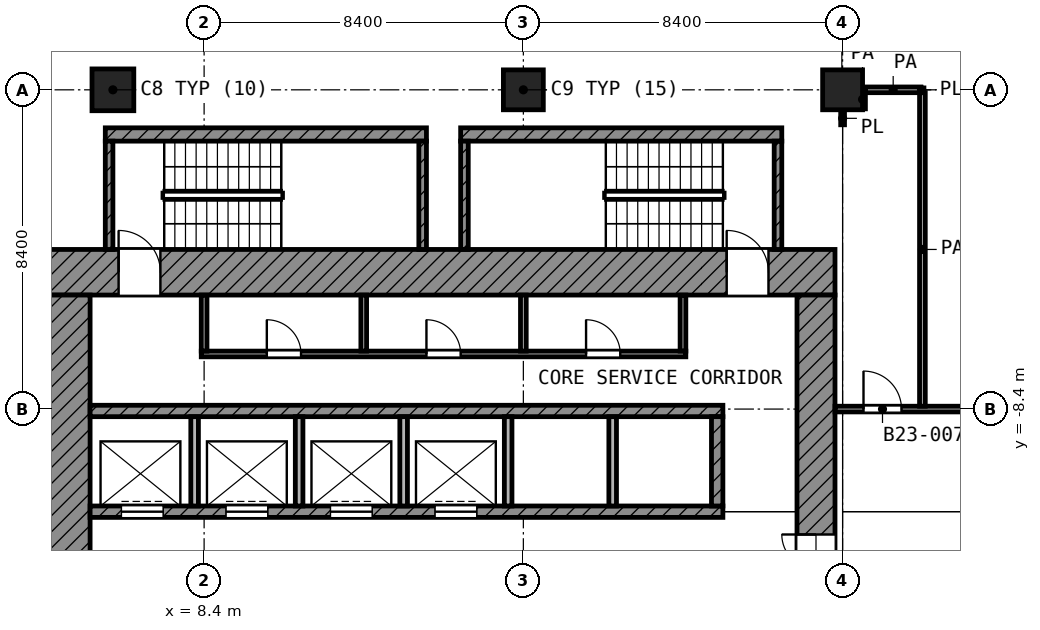
"""IFC4 building model, lengths in metres.
Left out: names, types, materials, properties, quantities, classifications, styles, units other than length and angle.
Written with IfcOpenShell. Run it as: python <this file> out.ifc"""

import sys

from ifc_helpers import new_model, si_unit, direction, frame, frame_2d, origin, origin_2d, place, context, subcontext, project, spatial, rectangle, extrude, element, fill, save


model = new_model("IFC4")
c1 = context("Model", 3, precision=1e-05, world=origin(), true_north=direction((0.0, 1.0)))
c2 = subcontext(c1, "Body", "Model", "MODEL_VIEW")
j1 = project(units=[si_unit("LENGTHUNIT", "METRE"), si_unit("PLANEANGLEUNIT", "RADIAN")], contexts=[c1])
p1 = place(None, origin())
s1 = spatial("IfcSite", under=j1, at=p1, CompositionType="ELEMENT")
p2 = place(p1, origin())
s2 = spatial("IfcBuilding", under=s1, at=p2, CompositionType="ELEMENT")
p3 = place(p2, frame((0.0, 0.0, 103.0)))
s3 = spatial("IfcBuildingStorey", under=s2, at=p3, CompositionType="ELEMENT", Elevation=103.0)
p4 = place(p3, frame((6.0, 0.0, 0.0), z_axis=(0.0, 0.0, 1.0), x_axis=(1.0, 0.0, 0.0)))
e1 = element("IfcColumn", 1, at=p4, inside=s3, PredefinedType="COLUMN", context=c2, shape_type="SweptSolid", body=[
    extrude(rectangle(XDim=1.1, YDim=1.1, at=origin_2d()), origin(), (0.0, 0.0, 1.0), 4.2),
])
for number, where, z_axis, x_axis in (
    (2, (16.8, 0.0, 0.0), (0.0, 0.0, 1.0), (1.0, 0.0, 0.0)),
    (3, (25.2, 0.0, 0.0), (0.0, 0.0, 1.0), (1.0, 0.0, 0.0)),
):
    element("IfcColumn", number, at=place(p3, frame(where, z_axis=z_axis, x_axis=x_axis)), inside=s3, PredefinedType="COLUMN", context=c2, shape_type="SweptSolid", body=[
        extrude(rectangle(XDim=1.05, YDim=1.05, at=origin_2d()), origin(), (0.0, 0.0, 1.0), 4.2),
    ])
p5 = place(p3, frame((4.2, -4.8, 0.0), z_axis=(0.0, 0.0, 1.0), x_axis=(1.0, 0.0, 0.0)))
e4 = element("IfcWall", 4, at=p5, inside=s3, PredefinedType="SHEAR", context=c2, shape_type="SweptSolid", body=[
    extrude(rectangle(XDim=20.8, YDim=1.2, at=frame_2d((10.4, 0.0))), origin(), (0.0, 0.0, 1.0), 3.6),
])
p6 = place(p5, frame((1.95, 0.0, 0.0)))
e5 = element("IfcOpeningElement", 5, at=p6, cuts=e4, PredefinedType="OPENING", context=c2, shape_type="SweptSolid", body=[
    extrude(rectangle(XDim=1.1, YDim=2.1, at=frame_2d((0.55, 1.05))), frame((0.0, 0.61, 0.0), z_axis=(0.0, -1.0, 0.0), x_axis=(1.0, 0.0, 0.0)), (0.0, 0.0, 1.0), 1.22),
])
p7 = place(p5, frame((17.95, 0.0, 0.0)))
e6 = element("IfcOpeningElement", 6, at=p7, cuts=e4, PredefinedType="OPENING", context=c2, shape_type="SweptSolid", body=[
    extrude(rectangle(XDim=1.1, YDim=2.1, at=frame_2d((0.55, 1.05))), frame((0.0, 0.61, 0.0), z_axis=(0.0, -1.0, 0.0), x_axis=(1.0, 0.0, 0.0)), (0.0, 0.0, 1.0), 1.22),
])
p8 = place(p3, frame((4.8, -25.0, 0.0), z_axis=(0.0, 0.0, 1.0), x_axis=(0.0, 1.0, 0.0)))
e7 = element("IfcWall", 7, at=p8, inside=s3, PredefinedType="SHEAR", context=c2, shape_type="SweptSolid", body=[
    extrude(rectangle(XDim=19.6, YDim=1.2, at=frame_2d((9.8, 0.0))), origin(), (0.0, 0.0, 1.0), 3.6),
])
p9 = place(p8, frame((11.45, 0.0, 0.0)))
e8 = element("IfcOpeningElement", 8, at=p9, cuts=e7, PredefinedType="OPENING", context=c2, shape_type="SweptSolid", body=[
    extrude(rectangle(XDim=1.1, YDim=2.1, at=frame_2d((0.55, 1.05))), frame((0.0, 0.61, 0.0), z_axis=(0.0, -1.0, 0.0), x_axis=(1.0, 0.0, 0.0)), (0.0, 0.0, 1.0), 1.22),
])
p10 = place(p8, frame((2.15, 0.0, 0.0)))
e9 = element("IfcOpeningElement", 9, at=p10, cuts=e7, PredefinedType="OPENING", context=c2, shape_type="SweptSolid", body=[
    extrude(rectangle(XDim=1.1, YDim=2.1, at=frame_2d((0.55, 1.05))), frame((0.0, 0.61, 0.0), z_axis=(0.0, -1.0, 0.0), x_axis=(1.0, 0.0, 0.0)), (0.0, 0.0, 1.0), 1.22),
])
p11 = place(p3, frame((24.5, -24.0, 0.0), z_axis=(0.0, 0.0, 1.0), x_axis=(0.0, 1.0, 0.0)))
e10 = element("IfcWall", 10, at=p11, inside=s3, PredefinedType="SHEAR", context=c2, shape_type="SweptSolid", body=[
    extrude(rectangle(XDim=18.6, YDim=1.0, at=frame_2d((9.3, 0.0))), origin(), (0.0, 0.0, 1.0), 3.6),
])
p12 = place(p11, frame((10.5, 0.0, 0.0)))
e11 = element("IfcOpeningElement", 11, at=p12, cuts=e10, PredefinedType="OPENING", context=c2, shape_type="SweptSolid", body=[
    extrude(rectangle(XDim=1.8, YDim=2.1, at=frame_2d((0.9, 1.05))), frame((0.0, 0.51, 0.0), z_axis=(0.0, -1.0, 0.0), x_axis=(1.0, 0.0, 0.0)), (0.0, 0.0, 1.0), 1.02),
])
p13 = place(p3, frame((5.4, -8.45, 0.0), z_axis=(0.0, 0.0, 1.0), x_axis=(1.0, 0.0, 0.0)))
e12 = element("IfcWall", 12, at=p13, inside=s3, PredefinedType="SHEAR", context=c2, shape_type="SweptSolid", body=[
    extrude(rectangle(XDim=16.65, YDim=0.3, at=frame_2d((8.325, 0.0))), origin(), (0.0, 0.0, 1.0), 3.6),
])
p14 = place(p3, frame((5.4, -11.1, 0.0), z_axis=(0.0, 0.0, 1.0), x_axis=(1.0, 0.0, 0.0)))
e13 = element("IfcWall", 13, at=p14, inside=s3, PredefinedType="SHEAR", context=c2, shape_type="SweptSolid", body=[
    extrude(rectangle(XDim=16.65, YDim=0.3, at=frame_2d((8.325, 0.0))), origin(), (0.0, 0.0, 1.0), 3.6),
])
p15 = place(p14, frame((0.825, 0.0, 0.0)))
e14 = element("IfcOpeningElement", 14, at=p15, cuts=e13, PredefinedType="OPENING", context=c2, shape_type="SweptSolid", body=[
    extrude(rectangle(XDim=1.1, YDim=2.1, at=frame_2d((0.55, 1.05))), frame((0.0, 0.16, 0.0), z_axis=(0.0, -1.0, 0.0), x_axis=(1.0, 0.0, 0.0)), (0.0, 0.0, 1.0), 0.32),
])
p16 = place(p14, frame((3.575, 0.0, 0.0)))
e15 = element("IfcOpeningElement", 15, at=p16, cuts=e13, PredefinedType="OPENING", context=c2, shape_type="SweptSolid", body=[
    extrude(rectangle(XDim=1.1, YDim=2.1, at=frame_2d((0.55, 1.05))), frame((0.0, 0.16, 0.0), z_axis=(0.0, -1.0, 0.0), x_axis=(1.0, 0.0, 0.0)), (0.0, 0.0, 1.0), 0.32),
])
p17 = place(p14, frame((6.325, 0.0, 0.0)))
e16 = element("IfcOpeningElement", 16, at=p17, cuts=e13, PredefinedType="OPENING", context=c2, shape_type="SweptSolid", body=[
    extrude(rectangle(XDim=1.1, YDim=2.1, at=frame_2d((0.55, 1.05))), frame((0.0, 0.16, 0.0), z_axis=(0.0, -1.0, 0.0), x_axis=(1.0, 0.0, 0.0)), (0.0, 0.0, 1.0), 0.32),
])
p18 = place(p14, frame((9.075, 0.0, 0.0)))
e17 = element("IfcOpeningElement", 17, at=p18, cuts=e13, PredefinedType="OPENING", context=c2, shape_type="SweptSolid", body=[
    extrude(rectangle(XDim=1.1, YDim=2.1, at=frame_2d((0.55, 1.05))), frame((0.0, 0.16, 0.0), z_axis=(0.0, -1.0, 0.0), x_axis=(1.0, 0.0, 0.0)), (0.0, 0.0, 1.0), 0.32),
])
p19 = place(p3, frame((21.9, -10.95, 0.0), z_axis=(0.0, 0.0, 1.0), x_axis=(0.0, 1.0, 0.0)))
e18 = element("IfcWall", 18, at=p19, inside=s3, PredefinedType="SHEAR", context=c2, shape_type="SweptSolid", body=[
    extrude(rectangle(XDim=2.35, YDim=0.3, at=frame_2d((1.175, 0.0))), origin(), (0.0, 0.0, 1.0), 3.6),
])
for number, where, z_axis, x_axis in (
    (19, (8.15, -10.95, 0.0), (0.0, 0.0, 1.0), (0.0, 1.0, 0.0)),
    (20, (10.9, -10.95, 0.0), (0.0, 0.0, 1.0), (0.0, 1.0, 0.0)),
    (21, (13.65, -10.95, 0.0), (0.0, 0.0, 1.0), (0.0, 1.0, 0.0)),
    (22, (16.4, -10.95, 0.0), (0.0, 0.0, 1.0), (0.0, 1.0, 0.0)),
    (23, (19.15, -10.95, 0.0), (0.0, 0.0, 1.0), (0.0, 1.0, 0.0)),
):
    element("IfcWall", number, at=place(p3, frame(where, z_axis=z_axis, x_axis=x_axis)), inside=s3, PredefinedType="PARTITIONING", context=c2, shape_type="SweptSolid", body=[
        extrude(rectangle(XDim=2.35, YDim=0.2, at=frame_2d((1.175, 0.0))), origin(), (0.0, 0.0, 1.0), 3.6),
    ])
p20 = place(p3, frame((8.325, -6.95, 0.0), z_axis=(0.0, 0.0, 1.0), x_axis=(1.0, 0.0, 0.0)))
e24 = element("IfcWall", 24, at=p20, inside=s3, PredefinedType="PARTITIONING", context=c2, shape_type="SweptSolid", body=[
    extrude(rectangle(XDim=12.75, YDim=0.15, at=frame_2d((6.375, 0.0))), origin(), (0.0, 0.0, 1.0), 3.6),
])
p21 = place(p20, frame((1.725, 0.0, 0.0)))
e25 = element("IfcOpeningElement", 25, at=p21, cuts=e24, PredefinedType="OPENING", context=c2, shape_type="SweptSolid", body=[
    extrude(rectangle(XDim=0.9, YDim=2.1, at=frame_2d((0.45, 1.05))), frame((0.0, 0.085, 0.0), z_axis=(0.0, -1.0, 0.0), x_axis=(1.0, 0.0, 0.0)), (0.0, 0.0, 1.0), 0.17),
])
p22 = place(p20, frame((5.925, 0.0, 0.0)))
e26 = element("IfcOpeningElement", 26, at=p22, cuts=e24, PredefinedType="OPENING", context=c2, shape_type="SweptSolid", body=[
    extrude(rectangle(XDim=0.9, YDim=2.1, at=frame_2d((0.45, 1.05))), frame((0.0, 0.085, 0.0), z_axis=(0.0, -1.0, 0.0), x_axis=(1.0, 0.0, 0.0)), (0.0, 0.0, 1.0), 0.17),
])
p23 = place(p20, frame((10.125, 0.0, 0.0)))
e27 = element("IfcOpeningElement", 27, at=p23, cuts=e24, PredefinedType="OPENING", context=c2, shape_type="SweptSolid", body=[
    extrude(rectangle(XDim=0.9, YDim=2.1, at=frame_2d((0.45, 1.05))), frame((0.0, 0.085, 0.0), z_axis=(0.0, -1.0, 0.0), x_axis=(1.0, 0.0, 0.0)), (0.0, 0.0, 1.0), 0.17),
])
for number, where, z_axis, x_axis in (
    (28, (8.4, -6.875, 0.0), (0.0, 0.0, 1.0), (0.0, 1.0, 0.0)),
    (29, (12.6, -6.875, 0.0), (0.0, 0.0, 1.0), (0.0, 1.0, 0.0)),
    (30, (16.8, -6.875, 0.0), (0.0, 0.0, 1.0), (0.0, 1.0, 0.0)),
    (31, (21.0, -6.875, 0.0), (0.0, 0.0, 1.0), (0.0, 1.0, 0.0)),
):
    element("IfcWall", number, at=place(p3, frame(where, z_axis=z_axis, x_axis=x_axis)), inside=s3, PredefinedType="PARTITIONING", context=c2, shape_type="SweptSolid", body=[
        extrude(rectangle(XDim=1.475, YDim=0.15, at=frame_2d((0.738, 0.0))), origin(), (0.0, 0.0, 1.0), 3.6),
    ])
p24 = place(p3, frame((5.8, -1.175, 0.0), z_axis=(0.0, 0.0, 1.0), x_axis=(1.0, 0.0, 0.0)))
e32 = element("IfcWall", 32, at=p24, inside=s3, PredefinedType="SHEAR", context=c2, shape_type="SweptSolid", body=[
    extrude(rectangle(XDim=8.45, YDim=0.35, at=frame_2d((4.225, 0.0))), origin(), (0.0, 0.0, 1.0), 3.6),
])
for number, where, z_axis, x_axis in (
    (33, (5.9, -4.2, 0.0), (0.0, 0.0, 1.0), (0.0, 1.0, 0.0)),
    (34, (14.15, -4.2, 0.0), (0.0, 0.0, 1.0), (0.0, 1.0, 0.0)),
):
    element("IfcWall", number, at=place(p3, frame(where, z_axis=z_axis, x_axis=x_axis)), inside=s3, PredefinedType="SHEAR", context=c2, shape_type="SweptSolid", body=[
        extrude(rectangle(XDim=2.85, YDim=0.2, at=frame_2d((1.425, 0.0))), origin(), (0.0, 0.0, 1.0), 3.6),
    ])
p25 = place(p3, frame((15.15, -1.175, 0.0), z_axis=(0.0, 0.0, 1.0), x_axis=(1.0, 0.0, 0.0)))
e35 = element("IfcWall", 35, at=p25, inside=s3, PredefinedType="SHEAR", context=c2, shape_type="SweptSolid", body=[
    extrude(rectangle(XDim=8.45, YDim=0.35, at=frame_2d((4.225, 0.0))), origin(), (0.0, 0.0, 1.0), 3.6),
])
for number, where, z_axis, x_axis in (
    (36, (15.25, -4.2, 0.0), (0.0, 0.0, 1.0), (0.0, 1.0, 0.0)),
    (37, (23.5, -4.2, 0.0), (0.0, 0.0, 1.0), (0.0, 1.0, 0.0)),
):
    element("IfcWall", number, at=place(p3, frame(where, z_axis=z_axis, x_axis=x_axis)), inside=s3, PredefinedType="SHEAR", context=c2, shape_type="SweptSolid", body=[
        extrude(rectangle(XDim=2.85, YDim=0.2, at=frame_2d((1.425, 0.0))), origin(), (0.0, 0.0, 1.0), 3.6),
    ])
p26 = place(p3, frame((27.22, 0.0, 0.0), z_axis=(0.0, 0.0, 1.0), x_axis=(1.0, 0.0, 0.0)))
e38 = element("IfcWall", 38, at=p26, inside=s3, PredefinedType="PARTITIONING", context=c2, shape_type="SweptSolid", body=[
    extrude(rectangle(XDim=0.12, YDim=0.1, at=frame_2d((0.06, 0.0))), origin(), (0.0, 0.0, 1.0), 3.6),
])
p27 = place(p3, frame((25.2, -0.92, 0.0), z_axis=(0.0, 0.0, 1.0), x_axis=(0.0, 1.0, 0.0)))
e39 = element("IfcWall", 39, at=p27, inside=s3, PredefinedType="PARTITIONING", context=c2, shape_type="SweptSolid", body=[
    extrude(rectangle(XDim=0.34, YDim=0.1, at=frame_2d((0.17, 0.0))), origin(), (0.0, 0.0, 1.0), 3.6),
])
p28 = place(p3, frame((25.0, -8.4, 0.0), z_axis=(0.0, 0.0, 1.0), x_axis=(1.0, 0.0, 0.0)))
e40 = element("IfcWall", 40, at=p28, inside=s3, PredefinedType="PARTITIONING", context=c2, shape_type="SweptSolid", body=[
    extrude(rectangle(XDim=15.107, YDim=0.15, at=frame_2d((7.553, 0.0))), origin(), (0.0, 0.0, 1.0), 3.6),
])
p29 = place(p28, frame((10.2, 0.0, 0.0)))
e41 = element("IfcOpeningElement", 41, at=p29, cuts=e40, PredefinedType="OPENING", context=c2, shape_type="SweptSolid", body=[
    extrude(rectangle(XDim=1.0, YDim=2.1, at=frame_2d((0.5, 1.05))), frame((0.0, 0.085, 0.0), z_axis=(0.0, -1.0, 0.0), x_axis=(1.0, 0.0, 0.0)), (0.0, 0.0, 1.0), 0.17),
])
p30 = place(p28, frame((0.75, 0.0, 0.0)))
e42 = element("IfcOpeningElement", 42, at=p30, cuts=e40, PredefinedType="OPENING", context=c2, shape_type="SweptSolid", body=[
    extrude(rectangle(XDim=1.0, YDim=2.1, at=frame_2d((0.5, 1.05))), frame((0.0, 0.085, 0.0), z_axis=(0.0, -1.0, 0.0), x_axis=(1.0, 0.0, 0.0)), (0.0, 0.0, 1.0), 0.17),
])
p31 = place(p28, frame((4.85, 0.0, 0.0)))
e43 = element("IfcOpeningElement", 43, at=p31, cuts=e40, PredefinedType="OPENING", context=c2, shape_type="SweptSolid", body=[
    extrude(rectangle(XDim=1.2, YDim=2.1, at=frame_2d((0.6, 1.05))), frame((0.0, 0.085, 0.0), z_axis=(0.0, -1.0, 0.0), x_axis=(1.0, 0.0, 0.0)), (0.0, 0.0, 1.0), 0.17),
])
p32 = place(p3, frame((25.802, 0.0, 0.0), z_axis=(0.0, 0.0, 1.0), x_axis=(1.0, 0.0, 0.0)))
e44 = element("IfcWall", 44, at=p32, inside=s3, PredefinedType="PARTITIONING", context=c2, shape_type="SweptSolid", body=[
    extrude(rectangle(XDim=1.458, YDim=0.15, at=frame_2d((0.729, 0.0))), origin(), (0.0, 0.0, 1.0), 3.6),
])
p33 = place(p3, frame((25.725, -0.5, 0.0), z_axis=(0.0, 0.0, 1.0), x_axis=(0.0, 1.0, 0.0)))
e45 = element("IfcWall", 45, at=p33, inside=s3, PredefinedType="PARTITIONING", context=c2, shape_type="SweptSolid", body=[
    extrude(rectangle(XDim=0.498, YDim=0.15, at=frame_2d((0.249, 0.0))), origin(), (0.0, 0.0, 1.0), 3.6),
])
p34 = place(p3, frame((27.3, -8.325, 0.0), z_axis=(0.0, 0.0, 1.0), x_axis=(0.0, 1.0, 0.0)))
e46 = element("IfcWall", 46, at=p34, inside=s3, PredefinedType="PARTITIONING", context=c2, shape_type="SweptSolid", body=[
    extrude(rectangle(XDim=8.25, YDim=0.15, at=frame_2d((4.125, 0.0))), origin(), (0.0, 0.0, 1.0), 3.6),
])
p35 = place(p15, origin())
e47 = element("IfcDoor", 47, at=p35, inside=s3, OperationType="DOUBLE_DOOR_SLIDING", PredefinedType="DOOR", context=c2, shape_type="SweptSolid", body=[
    extrude(rectangle(XDim=1.1, YDim=2.1, at=frame_2d((0.55, 1.05))), frame((0.0, 0.025, 0.0), z_axis=(0.0, -1.0, 0.0), x_axis=(1.0, 0.0, 0.0)), (0.0, 0.0, 1.0), 0.05),
])
fill(e14, e47)
p36 = place(p16, origin())
e48 = element("IfcDoor", 48, at=p36, inside=s3, OperationType="DOUBLE_DOOR_SLIDING", PredefinedType="DOOR", context=c2, shape_type="SweptSolid", body=[
    extrude(rectangle(XDim=1.1, YDim=2.1, at=frame_2d((0.55, 1.05))), frame((0.0, 0.025, 0.0), z_axis=(0.0, -1.0, 0.0), x_axis=(1.0, 0.0, 0.0)), (0.0, 0.0, 1.0), 0.05),
])
fill(e15, e48)
p37 = place(p17, origin())
e49 = element("IfcDoor", 49, at=p37, inside=s3, OperationType="DOUBLE_DOOR_SLIDING", PredefinedType="DOOR", context=c2, shape_type="SweptSolid", body=[
    extrude(rectangle(XDim=1.1, YDim=2.1, at=frame_2d((0.55, 1.05))), frame((0.0, 0.025, 0.0), z_axis=(0.0, -1.0, 0.0), x_axis=(1.0, 0.0, 0.0)), (0.0, 0.0, 1.0), 0.05),
])
fill(e16, e49)
p38 = place(p18, origin())
e50 = element("IfcDoor", 50, at=p38, inside=s3, OperationType="DOUBLE_DOOR_SLIDING", PredefinedType="DOOR", context=c2, shape_type="SweptSolid", body=[
    extrude(rectangle(XDim=1.1, YDim=2.1, at=frame_2d((0.55, 1.05))), frame((0.0, 0.025, 0.0), z_axis=(0.0, -1.0, 0.0), x_axis=(1.0, 0.0, 0.0)), (0.0, 0.0, 1.0), 0.05),
])
fill(e17, e50)
p39 = place(p6, origin())
e51 = element("IfcDoor", 51, at=p39, inside=s3, OperationType="SINGLE_SWING_LEFT", PredefinedType="DOOR", context=c2, shape_type="SweptSolid", body=[
    extrude(rectangle(XDim=1.1, YDim=2.1, at=frame_2d((0.55, 1.05))), frame((0.0, 0.025, 0.0), z_axis=(0.0, -1.0, 0.0), x_axis=(1.0, 0.0, 0.0)), (0.0, 0.0, 1.0), 0.05),
])
fill(e5, e51)
p40 = place(p7, origin())
e52 = element("IfcDoor", 52, at=p40, inside=s3, OperationType="SINGLE_SWING_LEFT", PredefinedType="DOOR", context=c2, shape_type="SweptSolid", body=[
    extrude(rectangle(XDim=1.1, YDim=2.1, at=frame_2d((0.55, 1.05))), frame((0.0, 0.025, 0.0), z_axis=(0.0, -1.0, 0.0), x_axis=(1.0, 0.0, 0.0)), (0.0, 0.0, 1.0), 0.05),
])
fill(e6, e52)
p41 = place(p12, origin())
e53 = element("IfcDoor", 53, at=p41, inside=s3, OperationType="DOUBLE_DOOR_SINGLE_SWING", PredefinedType="DOOR", context=c2, shape_type="SweptSolid", body=[
    extrude(rectangle(XDim=1.8, YDim=2.1, at=frame_2d((0.9, 1.05))), frame((0.0, 0.025, 0.0), z_axis=(0.0, -1.0, 0.0), x_axis=(1.0, 0.0, 0.0)), (0.0, 0.0, 1.0), 0.05),
])
fill(e11, e53)
p42 = place(p21, origin())
e54 = element("IfcDoor", 54, at=p42, inside=s3, OperationType="SINGLE_SWING_LEFT", PredefinedType="DOOR", context=c2, shape_type="SweptSolid", body=[
    extrude(rectangle(XDim=0.9, YDim=2.1, at=frame_2d((0.45, 1.05))), frame((0.0, 0.025, 0.0), z_axis=(0.0, -1.0, 0.0), x_axis=(1.0, 0.0, 0.0)), (0.0, 0.0, 1.0), 0.05),
])
fill(e25, e54)
p43 = place(p22, origin())
e55 = element("IfcDoor", 55, at=p43, inside=s3, OperationType="SINGLE_SWING_LEFT", PredefinedType="DOOR", context=c2, shape_type="SweptSolid", body=[
    extrude(rectangle(XDim=0.9, YDim=2.1, at=frame_2d((0.45, 1.05))), frame((0.0, 0.025, 0.0), z_axis=(0.0, -1.0, 0.0), x_axis=(1.0, 0.0, 0.0)), (0.0, 0.0, 1.0), 0.05),
])
fill(e26, e55)
p44 = place(p23, origin())
e56 = element("IfcDoor", 56, at=p44, inside=s3, OperationType="SINGLE_SWING_LEFT", PredefinedType="DOOR", context=c2, shape_type="SweptSolid", body=[
    extrude(rectangle(XDim=0.9, YDim=2.1, at=frame_2d((0.45, 1.05))), frame((0.0, 0.025, 0.0), z_axis=(0.0, -1.0, 0.0), x_axis=(1.0, 0.0, 0.0)), (0.0, 0.0, 1.0), 0.05),
])
fill(e27, e56)
p45 = place(p30, origin())
e57 = element("IfcDoor", 57, at=p45, inside=s3, OperationType="SINGLE_SWING_LEFT", PredefinedType="DOOR", context=c2, shape_type="SweptSolid", body=[
    extrude(rectangle(XDim=1.0, YDim=2.1, at=frame_2d((0.5, 1.05))), frame((0.0, 0.025, 0.0), z_axis=(0.0, -1.0, 0.0), x_axis=(1.0, 0.0, 0.0)), (0.0, 0.0, 1.0), 0.05),
])
fill(e42, e57)
save(model, sys.argv[1])
